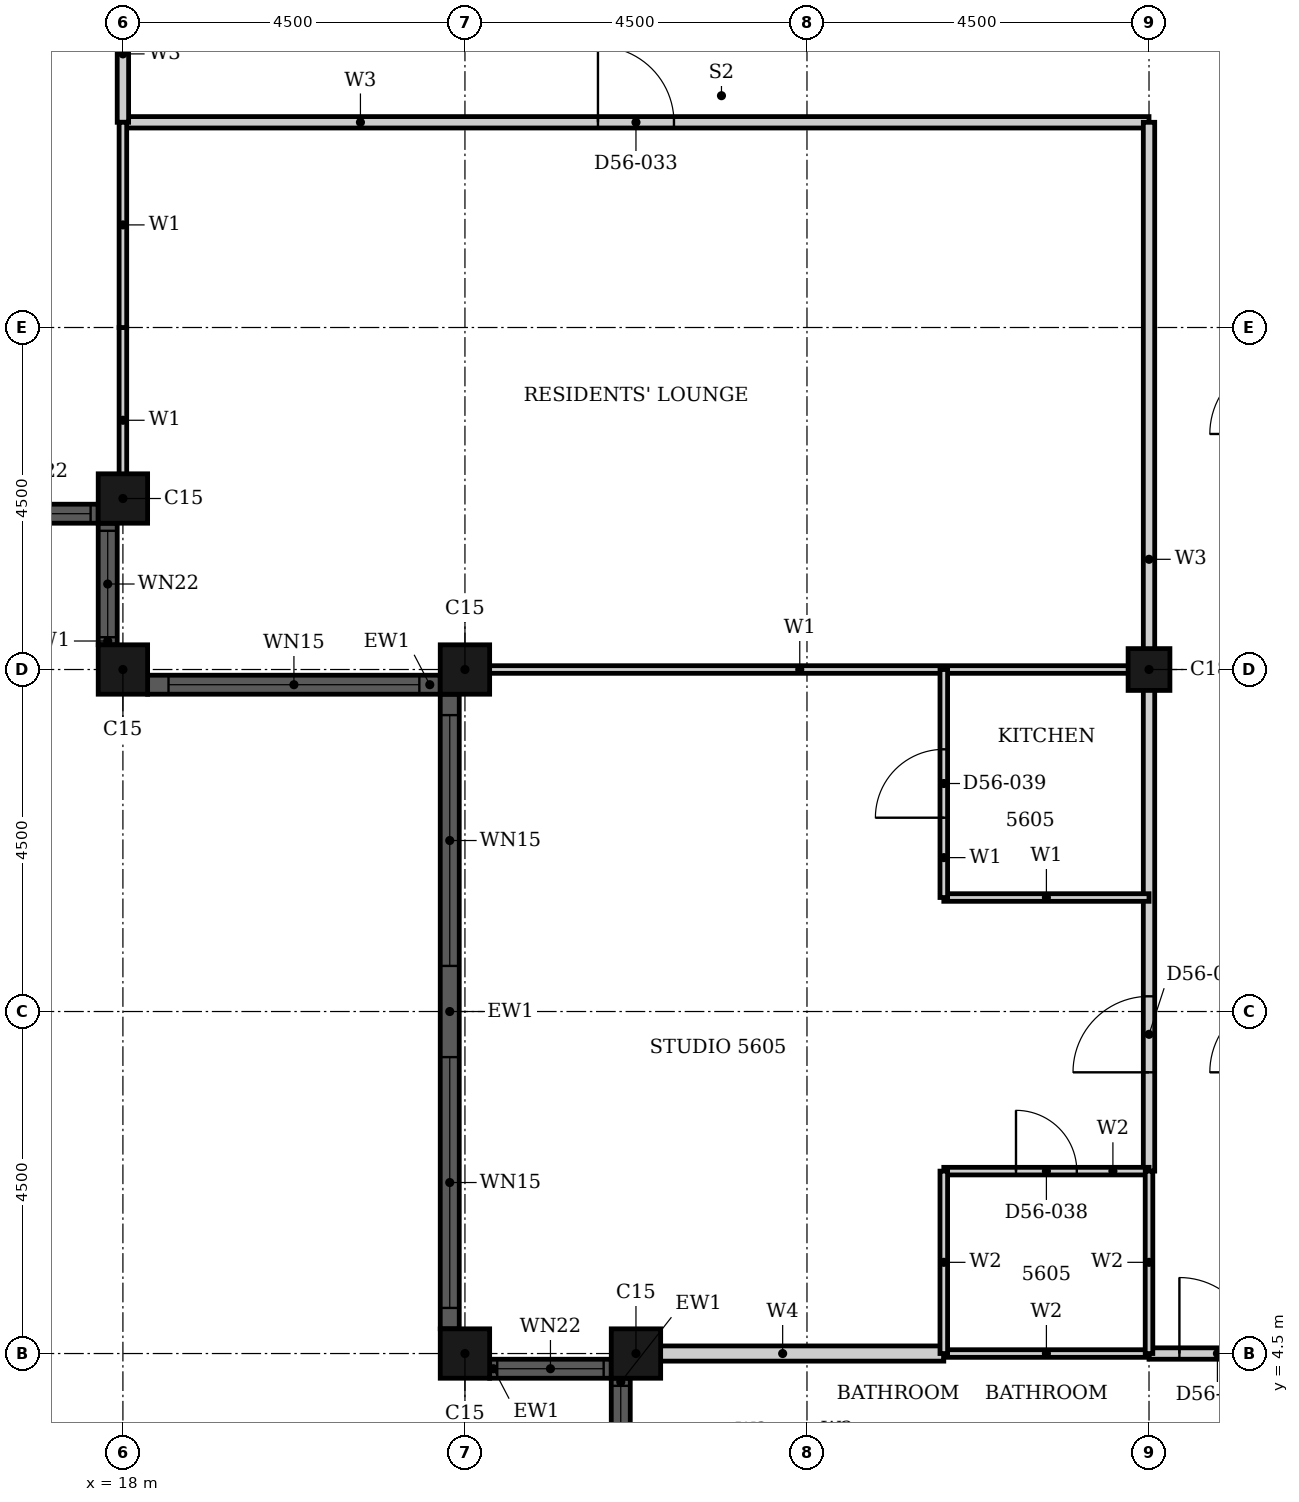
"""IFC4 building model, lengths in metres.
Left out: names, types, materials, properties, quantities, classifications, styles, units other than length and angle.
Written with IfcOpenShell. Run it as: python <this file> out.ifc"""

import sys

from ifc_helpers import new_model, si_unit, direction, frame, frame_2d, origin, origin_2d, place, context, subcontext, project, spatial, rectangle, hollow_rectangle, extrude, element, fill, save


model = new_model("IFC4")
c1 = context("Model", 3, precision=1e-05, world=origin(), true_north=direction((0.0, 1.0)))
c2 = subcontext(c1, "Body", "Model", "MODEL_VIEW")
j1 = project(units=[si_unit("LENGTHUNIT", "METRE"), si_unit("PLANEANGLEUNIT", "RADIAN")], contexts=[c1])
p1 = place(None, origin())
s1 = spatial("IfcSite", under=j1, at=p1, CompositionType="ELEMENT")
p2 = place(p1, origin())
s2 = spatial("IfcBuilding", under=s1, at=p2, CompositionType="ELEMENT")
p3 = place(p2, frame((0.0, 0.0, 222.0)))
s3 = spatial("IfcBuildingStorey", under=s2, at=p3, CompositionType="ELEMENT", Elevation=222.0)
for number, where, z_axis, x_axis in (
    (1, (18.0, 15.75, 0.0), (0.0, 0.0, 1.0), (1.0, 0.0, 0.0)),
    (2, (18.0, 13.5, 0.0), (0.0, 0.0, 1.0), (1.0, 0.0, 0.0)),
    (3, (22.5, 13.5, 0.0), (0.0, 0.0, 1.0), (1.0, 0.0, 0.0)),
    (4, (22.5, 4.5, 0.0), (0.0, 0.0, 1.0), (1.0, 0.0, 0.0)),
    (5, (24.75, 4.5, 0.0), (0.0, 0.0, 1.0), (1.0, 0.0, 0.0)),
):
    element("IfcColumn", number, at=place(p3, frame(where, z_axis=z_axis, x_axis=x_axis)), inside=s3, PredefinedType="COLUMN", context=c2, shape_type="SweptSolid", body=[
        extrude(hollow_rectangle(XDim=0.65, YDim=0.65, WallThickness=0.021, at=origin_2d()), origin(), (0.0, 0.0, 1.0), 3.7),
    ])
p4 = place(p3, frame((31.5, 13.5, 0.0), z_axis=(0.0, 0.0, 1.0), x_axis=(1.0, 0.0, 0.0)))
e6 = element("IfcColumn", 6, at=p4, inside=s3, PredefinedType="COLUMN", context=c2, shape_type="SweptSolid", body=[
    extrude(hollow_rectangle(XDim=0.55, YDim=0.55, WallThickness=0.018, at=origin_2d()), origin(), (0.0, 0.0, 1.0), 3.7),
])
p5 = place(p3, frame((16.075, 15.55, 0.0), z_axis=(0.0, 0.0, 1.0), x_axis=(1.0, 0.0, 0.0)))
e7 = element("IfcWall", 7, at=p5, inside=s3, PredefinedType="SOLIDWALL", context=c2, shape_type="SweptSolid", body=[
    extrude(rectangle(XDim=1.6, YDim=0.25, at=frame_2d((0.8, 0.0))), origin(), (0.0, 0.0, 1.0), 3.7),
])
p6 = place(p5, frame((0.1, 0.0, 0.9)))
e8 = element("IfcOpeningElement", 8, at=p6, cuts=e7, PredefinedType="OPENING", context=c2, shape_type="SweptSolid", body=[
    extrude(rectangle(XDim=1.4, YDim=1.85, at=frame_2d((0.7, 0.925))), frame((0.0, 0.135, 0.0), z_axis=(0.0, -1.0, 0.0), x_axis=(1.0, 0.0, 0.0)), (0.0, 0.0, 1.0), 0.27),
])
p7 = place(p3, frame((17.8, 15.425, 0.0), z_axis=(0.0, 0.0, 1.0), x_axis=(0.0, -1.0, 0.0)))
e9 = element("IfcWall", 9, at=p7, inside=s3, PredefinedType="SOLIDWALL", context=c2, shape_type="SweptSolid", body=[
    extrude(rectangle(XDim=1.6, YDim=0.25, at=frame_2d((0.8, 0.0))), origin(), (0.0, 0.0, 1.0), 3.7),
])
p8 = place(p7, frame((0.1, 0.0, 0.9)))
e10 = element("IfcOpeningElement", 10, at=p8, cuts=e9, PredefinedType="OPENING", context=c2, shape_type="SweptSolid", body=[
    extrude(rectangle(XDim=1.4, YDim=1.85, at=frame_2d((0.7, 0.925))), frame((0.0, 0.135, 0.0), z_axis=(0.0, -1.0, 0.0), x_axis=(1.0, 0.0, 0.0)), (0.0, 0.0, 1.0), 0.27),
])
p9 = place(p3, frame((18.325, 13.3, 0.0), z_axis=(0.0, 0.0, 1.0), x_axis=(1.0, 0.0, 0.0)))
e11 = element("IfcWall", 11, at=p9, inside=s3, PredefinedType="SOLIDWALL", context=c2, shape_type="SweptSolid", body=[
    extrude(rectangle(XDim=3.85, YDim=0.25, at=frame_2d((1.925, 0.0))), origin(), (0.0, 0.0, 1.0), 3.7),
])
p10 = place(p9, frame((0.275, 0.0, 0.45)))
e12 = element("IfcOpeningElement", 12, at=p10, cuts=e11, PredefinedType="OPENING", context=c2, shape_type="SweptSolid", body=[
    extrude(rectangle(XDim=3.3, YDim=2.3, at=frame_2d((1.65, 1.15))), frame((0.0, 0.135, 0.0), z_axis=(0.0, -1.0, 0.0), x_axis=(1.0, 0.0, 0.0)), (0.0, 0.0, 1.0), 0.27),
])
p11 = place(p3, frame((22.3, 13.175, 0.0), z_axis=(0.0, 0.0, 1.0), x_axis=(0.0, -1.0, 0.0)))
e13 = element("IfcWall", 13, at=p11, inside=s3, PredefinedType="SOLIDWALL", context=c2, shape_type="SweptSolid", body=[
    extrude(rectangle(XDim=8.35, YDim=0.25, at=frame_2d((4.175, 0.0))), origin(), (0.0, 0.0, 1.0), 3.7),
])
p12 = place(p11, frame((0.275, 0.0, 0.45)))
e14 = element("IfcOpeningElement", 14, at=p12, cuts=e13, PredefinedType="OPENING", context=c2, shape_type="SweptSolid", body=[
    extrude(rectangle(XDim=3.3, YDim=2.3, at=frame_2d((1.65, 1.15))), frame((0.0, 0.135, 0.0), z_axis=(0.0, -1.0, 0.0), x_axis=(1.0, 0.0, 0.0)), (0.0, 0.0, 1.0), 0.27),
])
p13 = place(p11, frame((4.775, 0.0, 0.45)))
e15 = element("IfcOpeningElement", 15, at=p13, cuts=e13, PredefinedType="OPENING", context=c2, shape_type="SweptSolid", body=[
    extrude(rectangle(XDim=3.3, YDim=2.3, at=frame_2d((1.65, 1.15))), frame((0.0, 0.135, 0.0), z_axis=(0.0, -1.0, 0.0), x_axis=(1.0, 0.0, 0.0)), (0.0, 0.0, 1.0), 0.27),
])
p14 = place(p3, frame((22.825, 4.3, 0.0), z_axis=(0.0, 0.0, 1.0), x_axis=(1.0, 0.0, 0.0)))
e16 = element("IfcWall", 16, at=p14, inside=s3, PredefinedType="SOLIDWALL", context=c2, shape_type="SweptSolid", body=[
    extrude(rectangle(XDim=1.6, YDim=0.25, at=frame_2d((0.8, 0.0))), origin(), (0.0, 0.0, 1.0), 3.7),
])
p15 = place(p14, frame((0.1, 0.0, 0.9)))
e17 = element("IfcOpeningElement", 17, at=p15, cuts=e16, PredefinedType="OPENING", context=c2, shape_type="SweptSolid", body=[
    extrude(rectangle(XDim=1.4, YDim=1.85, at=frame_2d((0.7, 0.925))), frame((0.0, 0.135, 0.0), z_axis=(0.0, -1.0, 0.0), x_axis=(1.0, 0.0, 0.0)), (0.0, 0.0, 1.0), 0.27),
])
p16 = place(p3, frame((24.55, 4.175, 0.0), z_axis=(0.0, 0.0, 1.0), x_axis=(0.0, -1.0, 0.0)))
e18 = element("IfcWall", 18, at=p16, inside=s3, PredefinedType="SOLIDWALL", context=c2, shape_type="SweptSolid", body=[
    extrude(rectangle(XDim=1.6, YDim=0.25, at=frame_2d((0.8, 0.0))), origin(), (0.0, 0.0, 1.0), 3.7),
])
p17 = place(p16, frame((0.1, 0.0, 0.9)))
e19 = element("IfcOpeningElement", 19, at=p17, cuts=e18, PredefinedType="OPENING", context=c2, shape_type="SweptSolid", body=[
    extrude(rectangle(XDim=1.4, YDim=1.85, at=frame_2d((0.7, 0.925))), frame((0.0, 0.135, 0.0), z_axis=(0.0, -1.0, 0.0), x_axis=(1.0, 0.0, 0.0)), (0.0, 0.0, 1.0), 0.27),
])
p18 = place(p3, frame((18.0, 20.7, 0.0), z_axis=(0.0, 0.0, 1.0), x_axis=(1.0, 0.0, 0.0)))
e20 = element("IfcWall", 20, at=p18, inside=s3, PredefinedType="PARTITIONING", context=c2, shape_type="SweptSolid", body=[
    extrude(rectangle(XDim=13.5, YDim=0.15, at=frame_2d((6.75, 0.0))), origin(), (0.0, 0.0, 1.0), 3.4),
])
p19 = place(p18, frame((6.25, 0.0, 0.0)))
e21 = element("IfcOpeningElement", 21, at=p19, cuts=e20, PredefinedType="OPENING", context=c2, shape_type="SweptSolid", body=[
    extrude(rectangle(XDim=1.0, YDim=2.1, at=frame_2d((0.5, 1.05))), frame((0.0, 0.085, 0.0), z_axis=(0.0, -1.0, 0.0), x_axis=(1.0, 0.0, 0.0)), (0.0, 0.0, 1.0), 0.17),
])
p20 = place(p3, frame((31.5, 4.5, 0.0), z_axis=(0.0, 0.0, 1.0), x_axis=(1.0, 0.0, 0.0)))
e22 = element("IfcWall", 22, at=p20, inside=s3, PredefinedType="PARTITIONING", context=c2, shape_type="SweptSolid", body=[
    extrude(rectangle(XDim=1.8, YDim=0.15, at=frame_2d((0.9, 0.0))), origin(), (0.0, 0.0, 1.0), 3.4),
])
p21 = place(p20, frame((0.4, 0.0, 0.0)))
e23 = element("IfcOpeningElement", 23, at=p21, cuts=e22, PredefinedType="OPENING", context=c2, shape_type="SweptSolid", body=[
    extrude(rectangle(XDim=1.0, YDim=2.2, at=frame_2d((0.5, 1.1))), frame((0.0, 0.085, 0.0), z_axis=(0.0, -1.0, 0.0), x_axis=(1.0, 0.0, 0.0)), (0.0, 0.0, 1.0), 0.17),
])
p22 = place(p3, frame((18.0, 20.7, 0.0), z_axis=(0.0, 0.0, 1.0), x_axis=(0.0, 1.0, 0.0)))
e24 = element("IfcWall", 24, at=p22, inside=s3, PredefinedType="PARTITIONING", context=c2, shape_type="SweptSolid", body=[
    extrude(rectangle(XDim=1.8, YDim=0.15, at=frame_2d((0.9, 0.0))), origin(), (0.0, 0.0, 1.0), 3.4),
])
p23 = place(p3, frame((31.5, 6.9, 0.0), z_axis=(0.0, 0.0, 1.0), x_axis=(0.0, 1.0, 0.0)))
e25 = element("IfcWall", 25, at=p23, inside=s3, PredefinedType="PARTITIONING", context=c2, shape_type="SweptSolid", body=[
    extrude(rectangle(XDim=13.8, YDim=0.15, at=frame_2d((6.9, 0.0))), origin(), (0.0, 0.0, 1.0), 2.68),
])
p24 = place(p23, frame((1.3, 0.0, 0.0)))
e26 = element("IfcOpeningElement", 26, at=p24, cuts=e25, PredefinedType="OPENING", context=c2, shape_type="SweptSolid", body=[
    extrude(rectangle(XDim=1.0, YDim=2.2, at=frame_2d((0.5, 1.1))), frame((0.0, 0.085, 0.0), z_axis=(0.0, -1.0, 0.0), x_axis=(1.0, 0.0, 0.0)), (0.0, 0.0, 1.0), 0.17),
])
p25 = place(p3, frame((28.8, 10.5, 0.0), z_axis=(0.0, 0.0, 1.0), x_axis=(1.0, 0.0, 0.0)))
e27 = element("IfcWall", 27, at=p25, inside=s3, PredefinedType="PARTITIONING", context=c2, shape_type="SweptSolid", body=[
    extrude(rectangle(XDim=2.7, YDim=0.1, at=frame_2d((1.35, 0.0))), origin(), (0.0, 0.0, 1.0), 3.4),
])
p26 = place(p3, frame((22.31, 13.5, 0.0), z_axis=(0.0, 0.0, 1.0), x_axis=(1.0, 0.0, 0.0)))
e28 = element("IfcWall", 28, at=p26, inside=s3, PredefinedType="PARTITIONING", context=c2, shape_type="SweptSolid", body=[
    extrude(rectangle(XDim=9.19, YDim=0.1, at=frame_2d((4.595, 0.0))), origin(), (0.0, 0.0, 1.0), 2.48),
])
p27 = place(p3, frame((18.0, 15.56, 0.0), z_axis=(0.0, 0.0, 1.0), x_axis=(0.0, 1.0, 0.0)))
e29 = element("IfcWall", 29, at=p27, inside=s3, PredefinedType="PARTITIONING", context=c2, shape_type="SweptSolid", body=[
    extrude(rectangle(XDim=2.439, YDim=0.1, at=frame_2d((1.219, 0.0))), origin(), (0.0, 0.0, 1.0), 3.4),
])
p28 = place(p3, frame((18.0, 18.0, 0.0), z_axis=(0.0, 0.0, 1.0), x_axis=(0.0, 1.0, 0.0)))
e30 = element("IfcWall", 30, at=p28, inside=s3, PredefinedType="PARTITIONING", context=c2, shape_type="SweptSolid", body=[
    extrude(rectangle(XDim=2.7, YDim=0.1, at=frame_2d((1.35, 0.0))), origin(), (0.0, 0.0, 1.0), 3.4),
])
p29 = place(p3, frame((28.8, 10.5, 0.0), z_axis=(0.0, 0.0, 1.0), x_axis=(0.0, 1.0, 0.0)))
e31 = element("IfcWall", 31, at=p29, inside=s3, PredefinedType="PARTITIONING", context=c2, shape_type="SweptSolid", body=[
    extrude(rectangle(XDim=3.0, YDim=0.1, at=frame_2d((1.5, 0.0))), origin(), (0.0, 0.0, 1.0), 3.4),
])
p30 = place(p29, frame((1.05, 0.0, 0.0)))
e32 = element("IfcOpeningElement", 32, at=p30, cuts=e31, PredefinedType="OPENING", context=c2, shape_type="SweptSolid", body=[
    extrude(rectangle(XDim=0.9, YDim=2.1, at=frame_2d((0.45, 1.05))), frame((0.0, 0.06, 0.0), z_axis=(0.0, -1.0, 0.0), x_axis=(1.0, 0.0, 0.0)), (0.0, 0.0, 1.0), 0.12),
])
p31 = place(p3, frame((24.56, 4.5, 0.0), z_axis=(0.0, 0.0, 1.0), x_axis=(1.0, 0.0, 0.0)))
e33 = element("IfcWall", 33, at=p31, inside=s3, PredefinedType="PARTITIONING", context=c2, shape_type="SweptSolid", body=[
    extrude(rectangle(XDim=4.24, YDim=0.2, at=frame_2d((2.12, 0.0))), origin(), (0.0, 0.0, 1.0), 3.4),
])
p32 = place(p3, frame((28.8, 4.5, 0.0), z_axis=(0.0, 0.0, 1.0), x_axis=(1.0, 0.0, 0.0)))
e34 = element("IfcWall", 34, at=p32, inside=s3, PredefinedType="PARTITIONING", context=c2, shape_type="SweptSolid", body=[
    extrude(rectangle(XDim=2.7, YDim=0.1, at=frame_2d((1.35, 0.0))), origin(), (0.0, 0.0, 1.0), 3.4),
])
p33 = place(p3, frame((28.8, 6.9, 0.0), z_axis=(0.0, 0.0, 1.0), x_axis=(1.0, 0.0, 0.0)))
e35 = element("IfcWall", 35, at=p33, inside=s3, PredefinedType="PARTITIONING", context=c2, shape_type="SweptSolid", body=[
    extrude(rectangle(XDim=2.7, YDim=0.1, at=frame_2d((1.35, 0.0))), origin(), (0.0, 0.0, 1.0), 3.4),
])
p34 = place(p33, frame((0.95, 0.0, 0.0)))
e36 = element("IfcOpeningElement", 36, at=p34, cuts=e35, PredefinedType="OPENING", context=c2, shape_type="SweptSolid", body=[
    extrude(rectangle(XDim=0.8, YDim=2.1, at=frame_2d((0.4, 1.05))), frame((0.0, 0.06, 0.0), z_axis=(0.0, -1.0, 0.0), x_axis=(1.0, 0.0, 0.0)), (0.0, 0.0, 1.0), 0.12),
])
p35 = place(p3, frame((28.8, 4.5, 0.0), z_axis=(0.0, 0.0, 1.0), x_axis=(0.0, 1.0, 0.0)))
e37 = element("IfcWall", 37, at=p35, inside=s3, PredefinedType="PARTITIONING", context=c2, shape_type="SweptSolid", body=[
    extrude(rectangle(XDim=2.4, YDim=0.1, at=frame_2d((1.2, 0.0))), origin(), (0.0, 0.0, 1.0), 3.4),
])
p36 = place(p3, frame((31.5, 4.5, 0.0), z_axis=(0.0, 0.0, 1.0), x_axis=(0.0, 1.0, 0.0)))
e38 = element("IfcWall", 38, at=p36, inside=s3, PredefinedType="PARTITIONING", context=c2, shape_type="SweptSolid", body=[
    extrude(rectangle(XDim=2.4, YDim=0.1, at=frame_2d((1.2, 0.0))), origin(), (0.0, 0.0, 1.0), 2.68),
])
p37 = place(p6, origin())
e39 = element("IfcWindow", 39, at=p37, inside=s3, PartitioningType="SINGLE_PANEL", PredefinedType="WINDOW", context=c2, shape_type="SweptSolid", body=[
    extrude(rectangle(XDim=1.4, YDim=1.85, at=frame_2d((0.7, 0.925))), frame((0.0, 0.03, 0.0), z_axis=(0.0, -1.0, 0.0), x_axis=(1.0, 0.0, 0.0)), (0.0, 0.0, 1.0), 0.06),
])
fill(e8, e39)
p38 = place(p8, origin())
e40 = element("IfcWindow", 40, at=p38, inside=s3, PartitioningType="SINGLE_PANEL", PredefinedType="WINDOW", context=c2, shape_type="SweptSolid", body=[
    extrude(rectangle(XDim=1.4, YDim=1.85, at=frame_2d((0.7, 0.925))), frame((0.0, 0.03, 0.0), z_axis=(0.0, -1.0, 0.0), x_axis=(1.0, 0.0, 0.0)), (0.0, 0.0, 1.0), 0.06),
])
fill(e10, e40)
p39 = place(p10, origin())
e41 = element("IfcWindow", 41, at=p39, inside=s3, PartitioningType="SINGLE_PANEL", PredefinedType="WINDOW", context=c2, shape_type="SweptSolid", body=[
    extrude(rectangle(XDim=3.3, YDim=2.3, at=frame_2d((1.65, 1.15))), frame((0.0, 0.03, 0.0), z_axis=(0.0, -1.0, 0.0), x_axis=(1.0, 0.0, 0.0)), (0.0, 0.0, 1.0), 0.06),
])
fill(e12, e41)
p40 = place(p12, origin())
e42 = element("IfcWindow", 42, at=p40, inside=s3, PartitioningType="SINGLE_PANEL", PredefinedType="WINDOW", context=c2, shape_type="SweptSolid", body=[
    extrude(rectangle(XDim=3.3, YDim=2.3, at=frame_2d((1.65, 1.15))), frame((0.0, 0.03, 0.0), z_axis=(0.0, -1.0, 0.0), x_axis=(1.0, 0.0, 0.0)), (0.0, 0.0, 1.0), 0.06),
])
fill(e14, e42)
p41 = place(p13, origin())
e43 = element("IfcWindow", 43, at=p41, inside=s3, PartitioningType="SINGLE_PANEL", PredefinedType="WINDOW", context=c2, shape_type="SweptSolid", body=[
    extrude(rectangle(XDim=3.3, YDim=2.3, at=frame_2d((1.65, 1.15))), frame((0.0, 0.03, 0.0), z_axis=(0.0, -1.0, 0.0), x_axis=(1.0, 0.0, 0.0)), (0.0, 0.0, 1.0), 0.06),
])
fill(e15, e43)
p42 = place(p15, origin())
e44 = element("IfcWindow", 44, at=p42, inside=s3, PartitioningType="SINGLE_PANEL", PredefinedType="WINDOW", context=c2, shape_type="SweptSolid", body=[
    extrude(rectangle(XDim=1.4, YDim=1.85, at=frame_2d((0.7, 0.925))), frame((0.0, 0.03, 0.0), z_axis=(0.0, -1.0, 0.0), x_axis=(1.0, 0.0, 0.0)), (0.0, 0.0, 1.0), 0.06),
])
fill(e17, e44)
p43 = place(p17, origin())
e45 = element("IfcWindow", 45, at=p43, inside=s3, PartitioningType="SINGLE_PANEL", PredefinedType="WINDOW", context=c2, shape_type="SweptSolid", body=[
    extrude(rectangle(XDim=1.4, YDim=1.85, at=frame_2d((0.7, 0.925))), frame((0.0, 0.03, 0.0), z_axis=(0.0, -1.0, 0.0), x_axis=(1.0, 0.0, 0.0)), (0.0, 0.0, 1.0), 0.06),
])
fill(e19, e45)
p44 = place(p19, origin())
e46 = element("IfcDoor", 46, at=p44, inside=s3, OperationType="SINGLE_SWING_RIGHT", PredefinedType="DOOR", context=c2, shape_type="SweptSolid", body=[
    extrude(rectangle(XDim=1.0, YDim=2.1, at=frame_2d((0.5, 1.05))), frame((0.0, 0.025, 0.0), z_axis=(0.0, -1.0, 0.0), x_axis=(1.0, 0.0, 0.0)), (0.0, 0.0, 1.0), 0.05),
])
fill(e21, e46)
p45 = place(p24, origin())
e47 = element("IfcDoor", 47, at=p45, inside=s3, OperationType="SINGLE_SWING_LEFT", PredefinedType="DOOR", context=c2, shape_type="SweptSolid", body=[
    extrude(rectangle(XDim=1.0, YDim=2.2, at=frame_2d((0.5, 1.1))), frame((0.0, 0.025, 0.0), z_axis=(0.0, -1.0, 0.0), x_axis=(1.0, 0.0, 0.0)), (0.0, 0.0, 1.0), 0.05),
])
fill(e26, e47)
p46 = place(p34, origin())
e48 = element("IfcDoor", 48, at=p46, inside=s3, OperationType="SINGLE_SWING_RIGHT", PredefinedType="DOOR", context=c2, shape_type="SweptSolid", body=[
    extrude(rectangle(XDim=0.8, YDim=2.1, at=frame_2d((0.4, 1.05))), frame((0.0, 0.025, 0.0), z_axis=(0.0, -1.0, 0.0), x_axis=(1.0, 0.0, 0.0)), (0.0, 0.0, 1.0), 0.05),
])
fill(e36, e48)
p47 = place(p30, origin())
e49 = element("IfcDoor", 49, at=p47, inside=s3, OperationType="SINGLE_SWING_RIGHT", PredefinedType="DOOR", context=c2, shape_type="SweptSolid", body=[
    extrude(rectangle(XDim=0.9, YDim=2.1, at=frame_2d((0.45, 1.05))), frame((0.0, 0.025, 0.0), z_axis=(0.0, -1.0, 0.0), x_axis=(1.0, 0.0, 0.0)), (0.0, 0.0, 1.0), 0.05),
])
fill(e32, e49)
p48 = place(p21, origin())
e50 = element("IfcDoor", 50, at=p48, inside=s3, OperationType="SINGLE_SWING_RIGHT", PredefinedType="DOOR", context=c2, shape_type="SweptSolid", body=[
    extrude(rectangle(XDim=1.0, YDim=2.2, at=frame_2d((0.5, 1.1))), frame((0.0, 0.025, 0.0), z_axis=(0.0, -1.0, 0.0), x_axis=(1.0, 0.0, 0.0)), (0.0, 0.0, 1.0), 0.05),
])
fill(e23, e50)
save(model, sys.argv[1])
